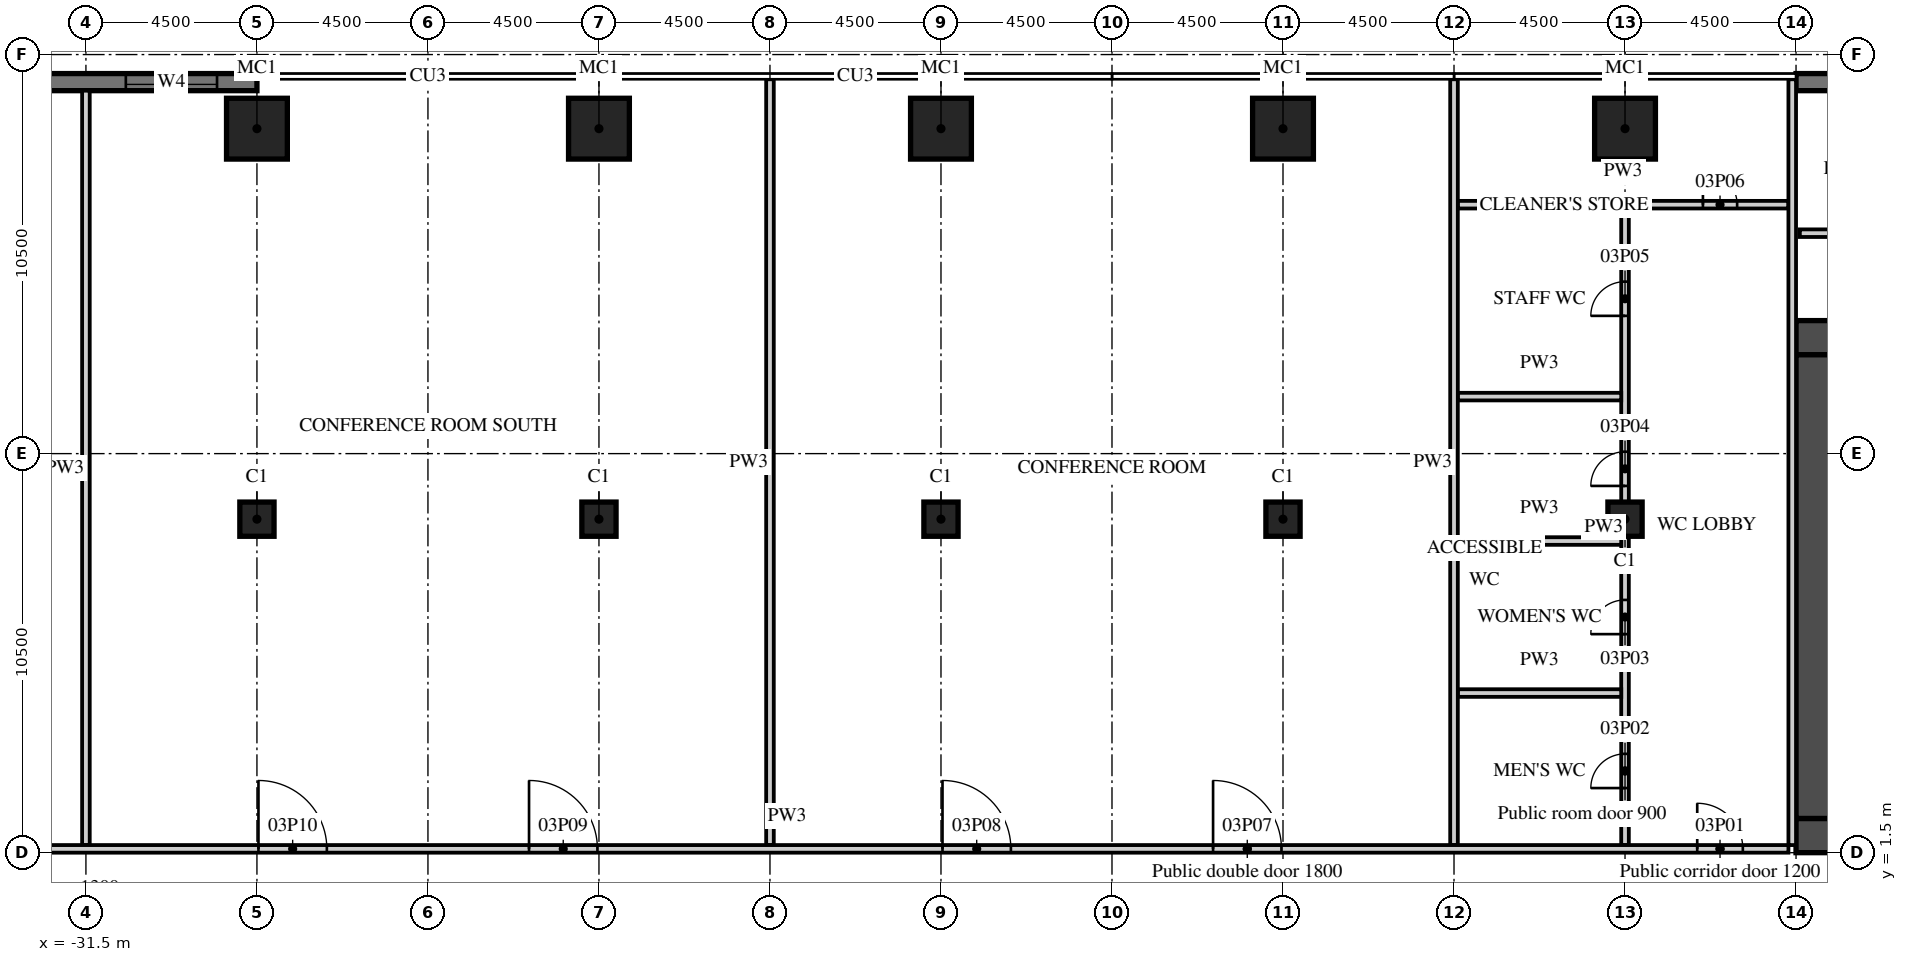
"""IFC4 building model, lengths in metres.
Left out: names, types, materials, properties, quantities, classifications, styles, units other than length and angle.
Written with IfcOpenShell. Run it as: python <this file> out.ifc"""

import sys

from ifc_helpers import new_model, si_unit, direction, frame, frame_2d, origin, origin_2d, place, context, subcontext, project, spatial, rectangle, extrude, element, fill, save


model = new_model("IFC4")
c1 = context("Model", 3, precision=1e-05, world=origin(), true_north=direction((0.0, 1.0)))
c2 = subcontext(c1, "Body", "Model", "MODEL_VIEW")
j1 = project(units=[si_unit("LENGTHUNIT", "METRE"), si_unit("PLANEANGLEUNIT", "RADIAN")], contexts=[c1])
p1 = place(None, origin())
s1 = spatial("IfcSite", under=j1, at=p1, CompositionType="ELEMENT")
p2 = place(p1, origin())
s2 = spatial("IfcBuilding", under=s1, at=p2, CompositionType="ELEMENT")
p3 = place(p2, frame((0.0, 0.0, 23.5)))
s3 = spatial("IfcBuildingStorey", under=s2, at=p3, CompositionType="ELEMENT", Elevation=23.5)
for number, where, z_axis, x_axis in (
    (1, (-27.0, 20.55, 0.0), (0.0, 0.0, 1.0), (1.0, 0.0, 0.0)),
    (2, (-18.0, 20.55, 0.0), (0.0, 0.0, 1.0), (1.0, 0.0, 0.0)),
    (3, (-9.0, 20.55, 0.0), (0.0, 0.0, 1.0), (1.0, 0.0, 0.0)),
    (4, (0.0, 20.55, 0.0), (0.0, 0.0, 1.0), (1.0, 0.0, 0.0)),
    (5, (9.0, 20.55, 0.0), (0.0, 0.0, 1.0), (1.0, 0.0, 0.0)),
):
    element("IfcColumn", number, at=place(p3, frame(where, z_axis=z_axis, x_axis=x_axis)), inside=s3, PredefinedType="COLUMN", context=c2, shape_type="SweptSolid", body=[
        extrude(rectangle(XDim=1.6, YDim=1.6, at=origin_2d()), origin(), (0.0, 0.0, 1.0), 5.5),
    ])
for number, where, z_axis, x_axis in (
    (6, (-27.0, 10.275, 0.0), (0.0, 0.0, 1.0), (1.0, 0.0, 0.0)),
    (7, (-18.0, 10.275, 0.0), (0.0, 0.0, 1.0), (1.0, 0.0, 0.0)),
    (8, (-9.0, 10.275, 0.0), (0.0, 0.0, 1.0), (1.0, 0.0, 0.0)),
    (9, (0.0, 10.275, 0.0), (0.0, 0.0, 1.0), (1.0, 0.0, 0.0)),
    (10, (9.0, 10.275, 0.0), (0.0, 0.0, 1.0), (1.0, 0.0, 0.0)),
):
    element("IfcColumn", number, at=place(p3, frame(where, z_axis=z_axis, x_axis=x_axis)), inside=s3, PredefinedType="COLUMN", context=c2, shape_type="SweptSolid", body=[
        extrude(rectangle(XDim=0.9, YDim=0.9, at=origin_2d()), origin(), (0.0, 0.0, 1.0), 5.5),
    ])
p4 = place(p3, frame((31.5, 21.775, 0.0), z_axis=(0.0, 0.0, 1.0), x_axis=(-1.0, 0.0, 0.0)))
e11 = element("IfcWall", 11, at=p4, inside=s3, PredefinedType="SOLIDWALL", context=c2, shape_type="SweptSolid", body=[
    extrude(rectangle(XDim=18.0, YDim=0.45, at=frame_2d((9.0, 0.0))), origin(), (0.0, 0.0, 1.0), 5.05),
])
p5 = place(p3, frame((-27.0, 21.775, 0.0), z_axis=(0.0, 0.0, 1.0), x_axis=(-1.0, 0.0, 0.0)))
e12 = element("IfcWall", 12, at=p5, inside=s3, PredefinedType="SOLIDWALL", context=c2, shape_type="SweptSolid", body=[
    extrude(rectangle(XDim=14.0, YDim=0.45, at=frame_2d((7.0, 0.0))), origin(), (0.0, 0.0, 1.0), 5.05),
])
p6 = place(p5, frame((1.05, 0.0, 0.9)))
e13 = element("IfcOpeningElement", 13, at=p6, cuts=e12, PredefinedType="OPENING", context=c2, shape_type="SweptSolid", body=[
    extrude(rectangle(XDim=2.4, YDim=1.8, at=frame_2d((1.2, 0.9))), frame((0.0, 0.235, 0.0), z_axis=(0.0, -1.0, 0.0), x_axis=(1.0, 0.0, 0.0)), (0.0, 0.0, 1.0), 0.47),
])
p7 = place(p5, frame((5.55, 0.0, 0.9)))
e14 = element("IfcOpeningElement", 14, at=p7, cuts=e12, PredefinedType="OPENING", context=c2, shape_type="SweptSolid", body=[
    extrude(rectangle(XDim=2.4, YDim=1.8, at=frame_2d((1.2, 0.9))), frame((0.0, 0.235, 0.0), z_axis=(0.0, -1.0, 0.0), x_axis=(1.0, 0.0, 0.0)), (0.0, 0.0, 1.0), 0.47),
])
p8 = place(p3, frame((13.5, 1.95, 0.0), z_axis=(0.0, 0.0, 1.0), x_axis=(1.0, 0.0, 0.0)))
e15 = element("IfcWall", 15, at=p8, inside=s3, PredefinedType="SHEAR", context=c2, shape_type="SweptSolid", body=[
    extrude(rectangle(XDim=18.0, YDim=0.9, at=frame_2d((9.0, 0.0))), origin(), (0.0, 0.0, 1.0), 5.05),
])
p9 = place(p8, frame((1.475, 0.0, 0.0)))
e16 = element("IfcOpeningElement", 16, at=p9, cuts=e15, PredefinedType="OPENING", context=c2, shape_type="SweptSolid", body=[
    extrude(rectangle(XDim=1.8, YDim=2.1, at=frame_2d((0.9, 1.05))), frame((0.0, 0.46, 0.0), z_axis=(0.0, -1.0, 0.0), x_axis=(1.0, 0.0, 0.0)), (0.0, 0.0, 1.0), 0.92),
])
p10 = place(p3, frame((13.5, 15.05, 0.0), z_axis=(0.0, 0.0, 1.0), x_axis=(1.0, 0.0, 0.0)))
e17 = element("IfcWall", 17, at=p10, inside=s3, PredefinedType="SHEAR", context=c2, shape_type="SweptSolid", body=[
    extrude(rectangle(XDim=6.8, YDim=0.9, at=frame_2d((3.4, 0.0))), origin(), (0.0, 0.0, 1.0), 5.05),
])
p11 = place(p10, frame((4.725, 0.0, 0.0)))
e18 = element("IfcOpeningElement", 18, at=p11, cuts=e17, PredefinedType="OPENING", context=c2, shape_type="SweptSolid", body=[
    extrude(rectangle(XDim=1.2, YDim=2.1, at=frame_2d((0.6, 1.05))), frame((0.0, 0.46, 0.0), z_axis=(0.0, -1.0, 0.0), x_axis=(1.0, 0.0, 0.0)), (0.0, 0.0, 1.0), 0.92),
])
p12 = place(p3, frame((13.95, 2.4, 0.0), z_axis=(0.0, 0.0, 1.0), x_axis=(0.0, 1.0, 0.0)))
e19 = element("IfcWall", 19, at=p12, inside=s3, PredefinedType="SHEAR", context=c2, shape_type="SweptSolid", body=[
    extrude(rectangle(XDim=12.2, YDim=0.9, at=frame_2d((6.1, 0.0))), origin(), (0.0, 0.0, 1.0), 5.05),
])
p13 = place(p3, frame((13.6, 17.8, 0.0), z_axis=(0.0, 0.0, 1.0), x_axis=(1.0, 0.0, 0.0)))
e20 = element("IfcWall", 20, at=p13, inside=s3, PredefinedType="PARTITIONING", context=c2, shape_type="SweptSolid", body=[
    extrude(rectangle(XDim=30.95, YDim=0.2, at=frame_2d((15.475, 0.0))), origin(), (0.0, 0.0, 1.0), 5.05),
])
p14 = place(p13, frame((16.613, 0.0, 0.0)))
e21 = element("IfcOpeningElement", 21, at=p14, cuts=e20, PredefinedType="OPENING", context=c2, shape_type="SweptSolid", body=[
    extrude(rectangle(XDim=0.9, YDim=2.1, at=frame_2d((0.45, 1.05))), frame((0.0, 0.11, 0.0), z_axis=(0.0, -1.0, 0.0), x_axis=(1.0, 0.0, 0.0)), (0.0, 0.0, 1.0), 0.22),
])
p15 = place(p13, frame((8.312, 0.0, 0.0)))
e22 = element("IfcOpeningElement", 22, at=p15, cuts=e20, PredefinedType="OPENING", context=c2, shape_type="SweptSolid", body=[
    extrude(rectangle(XDim=0.9, YDim=2.1, at=frame_2d((0.45, 1.05))), frame((0.0, 0.11, 0.0), z_axis=(0.0, -1.0, 0.0), x_axis=(1.0, 0.0, 0.0)), (0.0, 0.0, 1.0), 0.22),
])
p16 = place(p3, frame((9.0, 1.7, 0.0), z_axis=(0.0, 0.0, 1.0), x_axis=(0.0, 1.0, 0.0)))
e23 = element("IfcWall", 23, at=p16, inside=s3, PredefinedType="PARTITIONING", context=c2, shape_type="SweptSolid", body=[
    extrude(rectangle(XDim=16.75, YDim=0.2, at=frame_2d((8.375, 0.0))), origin(), (0.0, 0.0, 1.0), 5.05),
])
p17 = place(p16, frame((1.5, 0.0, 0.0)))
e24 = element("IfcOpeningElement", 24, at=p17, cuts=e23, PredefinedType="OPENING", context=c2, shape_type="SweptSolid", body=[
    extrude(rectangle(XDim=0.9, YDim=2.1, at=frame_2d((0.45, 1.05))), frame((0.0, 0.11, 0.0), z_axis=(0.0, -1.0, 0.0), x_axis=(1.0, 0.0, 0.0)), (0.0, 0.0, 1.0), 0.22),
])
p18 = place(p16, frame((5.55, 0.0, 0.0)))
e25 = element("IfcOpeningElement", 25, at=p18, cuts=e23, PredefinedType="OPENING", context=c2, shape_type="SweptSolid", body=[
    extrude(rectangle(XDim=0.9, YDim=2.1, at=frame_2d((0.45, 1.05))), frame((0.0, 0.11, 0.0), z_axis=(0.0, -1.0, 0.0), x_axis=(1.0, 0.0, 0.0)), (0.0, 0.0, 1.0), 0.22),
])
p19 = place(p16, frame((9.45, 0.0, 0.0)))
e26 = element("IfcOpeningElement", 26, at=p19, cuts=e23, PredefinedType="OPENING", context=c2, shape_type="SweptSolid", body=[
    extrude(rectangle(XDim=0.9, YDim=2.1, at=frame_2d((0.45, 1.05))), frame((0.0, 0.11, 0.0), z_axis=(0.0, -1.0, 0.0), x_axis=(1.0, 0.0, 0.0)), (0.0, 0.0, 1.0), 0.22),
])
p20 = place(p16, frame((13.925, 0.0, 0.0)))
e27 = element("IfcOpeningElement", 27, at=p20, cuts=e23, PredefinedType="OPENING", context=c2, shape_type="SweptSolid", body=[
    extrude(rectangle(XDim=0.9, YDim=2.1, at=frame_2d((0.45, 1.05))), frame((0.0, 0.11, 0.0), z_axis=(0.0, -1.0, 0.0), x_axis=(1.0, 0.0, 0.0)), (0.0, 0.0, 1.0), 0.22),
])
for number, where, z_axis, x_axis in (
    (28, (4.6, 5.7, 0.0), (0.0, 0.0, 1.0), (1.0, 0.0, 0.0)),
    (29, (4.6, 9.7, 0.0), (0.0, 0.0, 1.0), (1.0, 0.0, 0.0)),
    (30, (4.6, 13.5, 0.0), (0.0, 0.0, 1.0), (1.0, 0.0, 0.0)),
):
    element("IfcWall", number, at=place(p3, frame(where, z_axis=z_axis, x_axis=x_axis)), inside=s3, PredefinedType="PARTITIONING", context=c2, shape_type="SweptSolid", body=[
        extrude(rectangle(XDim=4.3, YDim=0.2, at=frame_2d((2.15, 0.0))), origin(), (0.0, 0.0, 1.0), 5.05),
    ])
p21 = place(p3, frame((4.6, 18.55, 0.0), z_axis=(0.0, 0.0, 1.0), x_axis=(1.0, 0.0, 0.0)))
e31 = element("IfcWall", 31, at=p21, inside=s3, PredefinedType="PARTITIONING", context=c2, shape_type="SweptSolid", body=[
    extrude(rectangle(XDim=8.7, YDim=0.2, at=frame_2d((4.35, 0.0))), origin(), (0.0, 0.0, 1.0), 5.05),
])
p22 = place(p21, frame((6.45, 0.0, 0.0)))
e32 = element("IfcOpeningElement", 32, at=p22, cuts=e31, PredefinedType="OPENING", context=c2, shape_type="SweptSolid", body=[
    extrude(rectangle(XDim=0.9, YDim=2.1, at=frame_2d((0.45, 1.05))), frame((0.0, 0.11, 0.0), z_axis=(0.0, -1.0, 0.0), x_axis=(1.0, 0.0, 0.0)), (0.0, 0.0, 1.0), 0.22),
])
for number, where, z_axis, x_axis in (
    (33, (4.5, 1.7, 0.0), (0.0, 0.0, 1.0), (0.0, 1.0, 0.0)),
    (34, (-13.5, 1.7, 0.0), (0.0, 0.0, 1.0), (0.0, 1.0, 0.0)),
):
    element("IfcWall", number, at=place(p3, frame(where, z_axis=z_axis, x_axis=x_axis)), inside=s3, PredefinedType="PARTITIONING", context=c2, shape_type="SweptSolid", body=[
        extrude(rectangle(XDim=20.15, YDim=0.2, at=frame_2d((10.075, 0.0))), origin(), (0.0, 0.0, 1.0), 5.05),
    ])
p23 = place(p3, frame((-31.5, 1.7, 0.0), z_axis=(0.0, 0.0, 1.0), x_axis=(0.0, 1.0, 0.0)))
e35 = element("IfcWall", 35, at=p23, inside=s3, PredefinedType="PARTITIONING", context=c2, shape_type="SweptSolid", body=[
    extrude(rectangle(XDim=19.85, YDim=0.2, at=frame_2d((9.925, 0.0))), origin(), (0.0, 0.0, 1.0), 5.05),
])
p24 = place(p3, frame((-39.4, 1.6, 0.0), z_axis=(0.0, 0.0, 1.0), x_axis=(1.0, 0.0, 0.0)))
e36 = element("IfcWall", 36, at=p24, inside=s3, PredefinedType="PARTITIONING", context=c2, shape_type="SweptSolid", body=[
    extrude(rectangle(XDim=52.7, YDim=0.2, at=frame_2d((26.35, 0.0))), origin(), (0.0, 0.0, 1.0), 5.05),
])
p25 = place(p24, frame((50.3, 0.0, 0.0)))
e37 = element("IfcOpeningElement", 37, at=p25, cuts=e36, PredefinedType="OPENING", context=c2, shape_type="SweptSolid", body=[
    extrude(rectangle(XDim=1.2, YDim=2.1, at=frame_2d((0.6, 1.05))), frame((0.0, 0.11, 0.0), z_axis=(0.0, -1.0, 0.0), x_axis=(1.0, 0.0, 0.0)), (0.0, 0.0, 1.0), 0.22),
])
p26 = place(p24, frame((37.56, 0.0, 0.0)))
e38 = element("IfcOpeningElement", 38, at=p26, cuts=e36, PredefinedType="OPENING", context=c2, shape_type="SweptSolid", body=[
    extrude(rectangle(XDim=1.8, YDim=2.1, at=frame_2d((0.9, 1.05))), frame((0.0, 0.11, 0.0), z_axis=(0.0, -1.0, 0.0), x_axis=(1.0, 0.0, 0.0)), (0.0, 0.0, 1.0), 0.22),
])
p27 = place(p24, frame((30.44, 0.0, 0.0)))
e39 = element("IfcOpeningElement", 39, at=p27, cuts=e36, PredefinedType="OPENING", context=c2, shape_type="SweptSolid", body=[
    extrude(rectangle(XDim=1.8, YDim=2.1, at=frame_2d((0.9, 1.05))), frame((0.0, 0.11, 0.0), z_axis=(0.0, -1.0, 0.0), x_axis=(1.0, 0.0, 0.0)), (0.0, 0.0, 1.0), 0.22),
])
p28 = place(p24, frame((19.56, 0.0, 0.0)))
e40 = element("IfcOpeningElement", 40, at=p28, cuts=e36, PredefinedType="OPENING", context=c2, shape_type="SweptSolid", body=[
    extrude(rectangle(XDim=1.8, YDim=2.1, at=frame_2d((0.9, 1.05))), frame((0.0, 0.11, 0.0), z_axis=(0.0, -1.0, 0.0), x_axis=(1.0, 0.0, 0.0)), (0.0, 0.0, 1.0), 0.22),
])
p29 = place(p24, frame((12.44, 0.0, 0.0)))
e41 = element("IfcOpeningElement", 41, at=p29, cuts=e36, PredefinedType="OPENING", context=c2, shape_type="SweptSolid", body=[
    extrude(rectangle(XDim=1.8, YDim=2.1, at=frame_2d((0.9, 1.05))), frame((0.0, 0.11, 0.0), z_axis=(0.0, -1.0, 0.0), x_axis=(1.0, 0.0, 0.0)), (0.0, 0.0, 1.0), 0.22),
])
p30 = place(p24, frame((3.1, 0.0, 0.0)))
e42 = element("IfcOpeningElement", 42, at=p30, cuts=e36, PredefinedType="OPENING", context=c2, shape_type="SweptSolid", body=[
    extrude(rectangle(XDim=1.8, YDim=2.1, at=frame_2d((0.9, 1.05))), frame((0.0, 0.11, 0.0), z_axis=(0.0, -1.0, 0.0), x_axis=(1.0, 0.0, 0.0)), (0.0, 0.0, 1.0), 0.22),
])
p31 = place(p3, frame((13.4, 1.7, 0.0), z_axis=(0.0, 0.0, 1.0), x_axis=(0.0, 1.0, 0.0)))
e43 = element("IfcWall", 43, at=p31, inside=s3, PredefinedType="PARTITIONING", context=c2, shape_type="SweptSolid", body=[
    extrude(rectangle(XDim=20.15, YDim=0.2, at=frame_2d((10.075, 0.0))), origin(), (0.0, 0.0, 1.0), 5.05),
])
p32 = place(p6, origin())
e44 = element("IfcWindow", 44, at=p32, inside=s3, PartitioningType="SINGLE_PANEL", PredefinedType="WINDOW", context=c2, shape_type="SweptSolid", body=[
    extrude(rectangle(XDim=2.4, YDim=1.8, at=frame_2d((1.2, 0.9))), frame((0.0, 0.09, 0.0), z_axis=(0.0, -1.0, 0.0), x_axis=(1.0, 0.0, 0.0)), (0.0, 0.0, 1.0), 0.06),
])
fill(e13, e44)
p33 = place(p25, origin())
e45 = element("IfcDoor", 45, at=p33, inside=s3, OperationType="SINGLE_SWING_LEFT", PredefinedType="DOOR", context=c2, shape_type="SweptSolid", body=[
    extrude(rectangle(XDim=1.2, YDim=2.1, at=frame_2d((0.6, 1.05))), frame((0.0, 0.025, 0.0), z_axis=(0.0, -1.0, 0.0), x_axis=(1.0, 0.0, 0.0)), (0.0, 0.0, 1.0), 0.05),
])
fill(e37, e45)
p34 = place(p17, origin())
e46 = element("IfcDoor", 46, at=p34, inside=s3, OperationType="SINGLE_SWING_LEFT", PredefinedType="DOOR", context=c2, shape_type="SweptSolid", body=[
    extrude(rectangle(XDim=0.9, YDim=2.1, at=frame_2d((0.45, 1.05))), frame((0.0, 0.025, 0.0), z_axis=(0.0, -1.0, 0.0), x_axis=(1.0, 0.0, 0.0)), (0.0, 0.0, 1.0), 0.05),
])
fill(e24, e46)
p35 = place(p18, origin())
e47 = element("IfcDoor", 47, at=p35, inside=s3, OperationType="SINGLE_SWING_LEFT", PredefinedType="DOOR", context=c2, shape_type="SweptSolid", body=[
    extrude(rectangle(XDim=0.9, YDim=2.1, at=frame_2d((0.45, 1.05))), frame((0.0, 0.025, 0.0), z_axis=(0.0, -1.0, 0.0), x_axis=(1.0, 0.0, 0.0)), (0.0, 0.0, 1.0), 0.05),
])
fill(e25, e47)
p36 = place(p19, origin())
e48 = element("IfcDoor", 48, at=p36, inside=s3, OperationType="SINGLE_SWING_LEFT", PredefinedType="DOOR", context=c2, shape_type="SweptSolid", body=[
    extrude(rectangle(XDim=0.9, YDim=2.1, at=frame_2d((0.45, 1.05))), frame((0.0, 0.025, 0.0), z_axis=(0.0, -1.0, 0.0), x_axis=(1.0, 0.0, 0.0)), (0.0, 0.0, 1.0), 0.05),
])
fill(e26, e48)
p37 = place(p20, origin())
e49 = element("IfcDoor", 49, at=p37, inside=s3, OperationType="SINGLE_SWING_LEFT", PredefinedType="DOOR", context=c2, shape_type="SweptSolid", body=[
    extrude(rectangle(XDim=0.9, YDim=2.1, at=frame_2d((0.45, 1.05))), frame((0.0, 0.025, 0.0), z_axis=(0.0, -1.0, 0.0), x_axis=(1.0, 0.0, 0.0)), (0.0, 0.0, 1.0), 0.05),
])
fill(e27, e49)
p38 = place(p22, origin())
e50 = element("IfcDoor", 50, at=p38, inside=s3, OperationType="SINGLE_SWING_LEFT", PredefinedType="DOOR", context=c2, shape_type="SweptSolid", body=[
    extrude(rectangle(XDim=0.9, YDim=2.1, at=frame_2d((0.45, 1.05))), frame((0.0, 0.025, 0.0), z_axis=(0.0, -1.0, 0.0), x_axis=(1.0, 0.0, 0.0)), (0.0, 0.0, 1.0), 0.05),
])
fill(e32, e50)
p39 = place(p26, origin())
e51 = element("IfcDoor", 51, at=p39, inside=s3, OperationType="DOUBLE_DOOR_DOUBLE_SWING", PredefinedType="DOOR", context=c2, shape_type="SweptSolid", body=[
    extrude(rectangle(XDim=1.8, YDim=2.1, at=frame_2d((0.9, 1.05))), frame((0.0, 0.025, 0.0), z_axis=(0.0, -1.0, 0.0), x_axis=(1.0, 0.0, 0.0)), (0.0, 0.0, 1.0), 0.05),
])
fill(e38, e51)
p40 = place(p27, origin())
e52 = element("IfcDoor", 52, at=p40, inside=s3, OperationType="DOUBLE_DOOR_DOUBLE_SWING", PredefinedType="DOOR", context=c2, shape_type="SweptSolid", body=[
    extrude(rectangle(XDim=1.8, YDim=2.1, at=frame_2d((0.9, 1.05))), frame((0.0, 0.025, 0.0), z_axis=(0.0, -1.0, 0.0), x_axis=(1.0, 0.0, 0.0)), (0.0, 0.0, 1.0), 0.05),
])
fill(e39, e52)
p41 = place(p28, origin())
e53 = element("IfcDoor", 53, at=p41, inside=s3, OperationType="DOUBLE_DOOR_DOUBLE_SWING", PredefinedType="DOOR", context=c2, shape_type="SweptSolid", body=[
    extrude(rectangle(XDim=1.8, YDim=2.1, at=frame_2d((0.9, 1.05))), frame((0.0, 0.025, 0.0), z_axis=(0.0, -1.0, 0.0), x_axis=(1.0, 0.0, 0.0)), (0.0, 0.0, 1.0), 0.05),
])
fill(e40, e53)
p42 = place(p29, origin())
e54 = element("IfcDoor", 54, at=p42, inside=s3, OperationType="DOUBLE_DOOR_DOUBLE_SWING", PredefinedType="DOOR", context=c2, shape_type="SweptSolid", body=[
    extrude(rectangle(XDim=1.8, YDim=2.1, at=frame_2d((0.9, 1.05))), frame((0.0, 0.025, 0.0), z_axis=(0.0, -1.0, 0.0), x_axis=(1.0, 0.0, 0.0)), (0.0, 0.0, 1.0), 0.05),
])
fill(e41, e54)
save(model, sys.argv[1])
